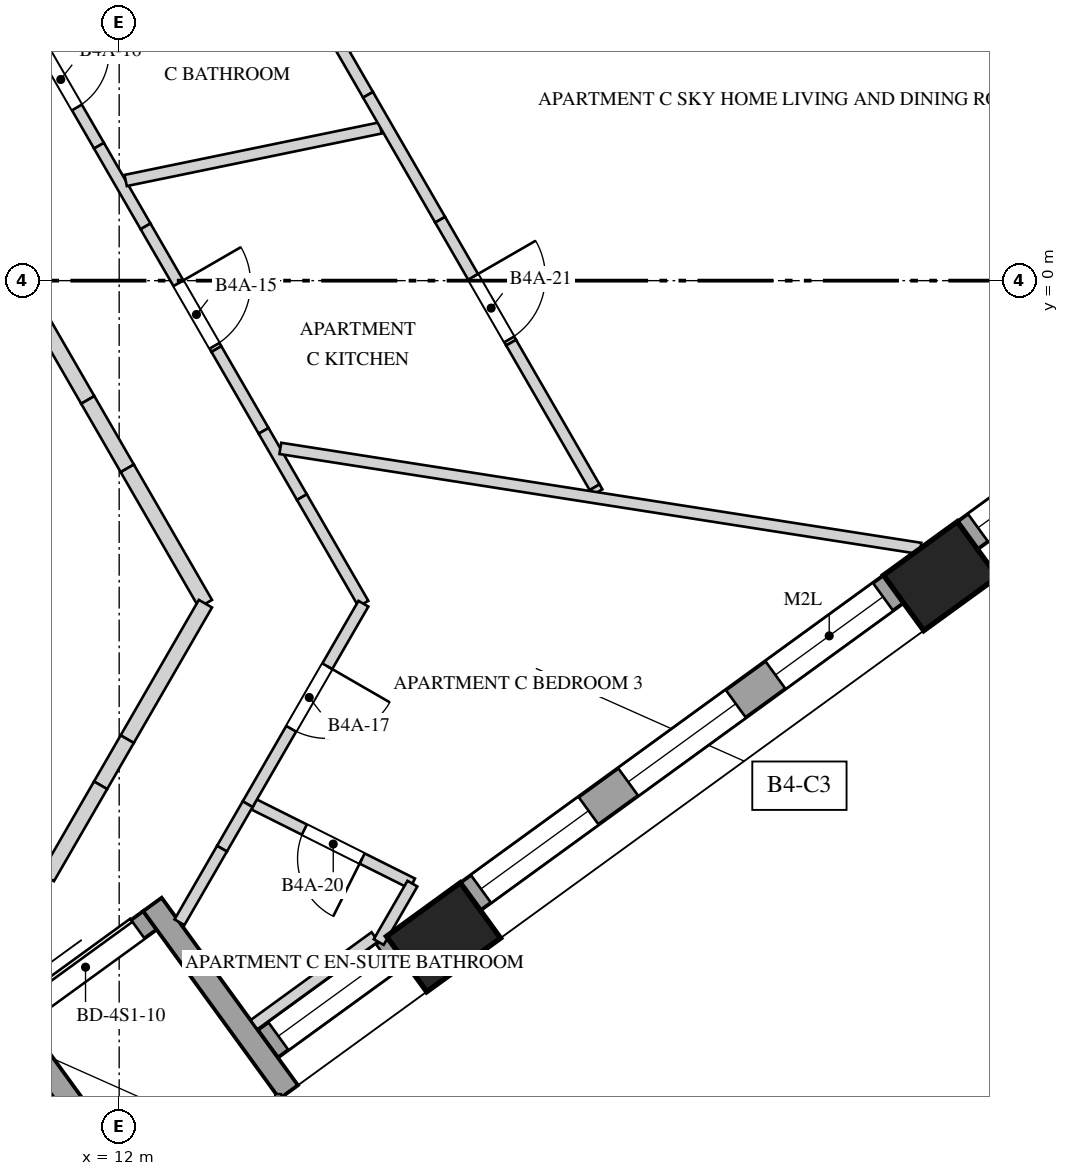
"""IFC4 building model, lengths in metres.
Left out: names, types, materials, properties, quantities, classifications, styles, units other than length and angle.
Written with IfcOpenShell. Run it as: python <this file> out.ifc"""

import sys

from ifc_helpers import new_model, si_unit, direction, frame, frame_2d, origin, origin_2d, place, context, subcontext, project, spatial, polyline, rectangle, outline, extrude, element, fill, save


model = new_model("IFC4")
c1 = context("Model", 3, precision=1e-05, world=origin(), true_north=direction((0.0, 1.0)))
c2 = subcontext(c1, "Body", "Model", "MODEL_VIEW")
j1 = project(units=[si_unit("LENGTHUNIT", "METRE"), si_unit("PLANEANGLEUNIT", "RADIAN")], contexts=[c1])
p1 = place(None, origin())
s1 = spatial("IfcSite", under=j1, at=p1, CompositionType="ELEMENT")
p2 = place(p1, origin())
s2 = spatial("IfcBuilding", under=s1, at=p2, CompositionType="ELEMENT")
p3 = place(p2, frame((0.0, 0.0, 162.8)))
s3 = spatial("IfcBuildingStorey", under=s2, at=p3, CompositionType="ELEMENT", Elevation=162.8)
for number, where, z_axis, x_axis in (
    (1, (16.267, -8.638, -0.35), (0.0, 0.0, 1.0), (0.809, 0.588, 0.0)),
    (2, (22.806, -3.887, -0.35), (0.0, 0.0, 1.0), (0.809, 0.588, 0.0)),
):
    element("IfcColumn", number, at=place(p3, frame(where, z_axis=z_axis, x_axis=x_axis)), inside=s3, PredefinedType="COLUMN", context=c2, shape_type="SweptSolid", body=[
        extrude(rectangle(XDim=1.2, YDim=0.9, at=origin_2d()), origin(), (0.0, 0.0, 1.0), 4.35),
    ])
p4 = place(p3, frame((13.955, -10.04, 0.0), z_axis=(0.0, 0.0, 1.0), x_axis=(0.809028366311, 0.587769599847, 0.0)))
e3 = element("IfcWall", 3, at=p4, inside=s3, PredefinedType="SOLIDWALL", context=c2, shape_type="SweptSolid", body=[
    extrude(rectangle(XDim=2.094, YDim=0.45, at=frame_2d((1.047, 0.0))), origin(), (0.0, 0.0, 1.0), 3.3),
])
p5 = place(p4, frame((0.172, 0.0, 0.5)))
e4 = element("IfcOpeningElement", 4, at=p5, cuts=e3, PredefinedType="OPENING", context=c2, shape_type="SweptSolid", body=[
    extrude(rectangle(XDim=1.75, YDim=2.65, at=frame_2d((0.875, 1.325))), frame((0.0, 0.235, 0.0), z_axis=(0.0, -1.0, 0.0), x_axis=(1.0, 0.0, 0.0)), (0.0, 0.0, 1.0), 0.47),
])
p6 = place(p3, frame((16.62, -8.104, 0.0), z_axis=(0.0, 0.0, 1.0), x_axis=(0.809016690404, 0.587785670672, 0.0)))
e5 = element("IfcWall", 5, at=p6, inside=s3, PredefinedType="SOLIDWALL", context=c2, shape_type="SweptSolid", body=[
    extrude(rectangle(XDim=6.883, YDim=0.45, at=frame_2d((3.441, 0.0))), origin(), (0.0, 0.0, 1.0), 3.3),
])
p7 = place(p6, frame((0.172, 0.0, 0.5)))
e6 = element("IfcOpeningElement", 6, at=p7, cuts=e5, PredefinedType="OPENING", context=c2, shape_type="SweptSolid", body=[
    extrude(rectangle(XDim=1.75, YDim=2.65, at=frame_2d((0.875, 1.325))), frame((0.0, 0.235, 0.0), z_axis=(0.0, -1.0, 0.0), x_axis=(1.0, 0.0, 0.0)), (0.0, 0.0, 1.0), 0.47),
])
p8 = place(p6, frame((2.566, 0.0, 0.5)))
e7 = element("IfcOpeningElement", 7, at=p8, cuts=e5, PredefinedType="OPENING", context=c2, shape_type="SweptSolid", body=[
    extrude(rectangle(XDim=1.75, YDim=2.65, at=frame_2d((0.875, 1.325))), frame((0.0, 0.235, 0.0), z_axis=(0.0, -1.0, 0.0), x_axis=(1.0, 0.0, 0.0)), (0.0, 0.0, 1.0), 0.47),
])
p9 = place(p6, frame((4.961, 0.0, 0.5)))
e8 = element("IfcOpeningElement", 8, at=p9, cuts=e5, PredefinedType="OPENING", context=c2, shape_type="SweptSolid", body=[
    extrude(rectangle(XDim=1.75, YDim=2.0, at=frame_2d((0.875, 1.0))), frame((0.0, 0.235, 0.0), z_axis=(0.0, -1.0, 0.0), x_axis=(1.0, 0.0, 0.0)), (0.0, 0.0, 1.0), 0.47),
])
p10 = place(p3, frame((23.159, -3.353, 0.0), z_axis=(0.0, 0.0, 1.0), x_axis=(0.809005790194, 0.587800673215, 0.0)))
e9 = element("IfcWall", 9, at=p10, inside=s3, PredefinedType="SOLIDWALL", context=c2, shape_type="SweptSolid", body=[
    extrude(rectangle(XDim=6.183, YDim=0.45, at=frame_2d((3.091, 0.0))), origin(), (0.0, 0.0, 1.0), 3.3),
])
p11 = place(p10, frame((0.172, 0.0, 0.5)))
e10 = element("IfcOpeningElement", 10, at=p11, cuts=e9, PredefinedType="OPENING", context=c2, shape_type="SweptSolid", body=[
    extrude(rectangle(XDim=1.75, YDim=2.65, at=frame_2d((0.875, 1.325))), frame((0.0, 0.235, 0.0), z_axis=(0.0, -1.0, 0.0), x_axis=(1.0, 0.0, 0.0)), (0.0, 0.0, 1.0), 0.47),
])
p12 = place(p10, frame((2.566, 0.0, 0.5)))
e11 = element("IfcOpeningElement", 11, at=p12, cuts=e9, PredefinedType="OPENING", context=c2, shape_type="SweptSolid", body=[
    extrude(rectangle(XDim=1.75, YDim=2.65, at=frame_2d((0.875, 1.325))), frame((0.0, 0.235, 0.0), z_axis=(0.0, -1.0, 0.0), x_axis=(1.0, 0.0, 0.0)), (0.0, 0.0, 1.0), 0.47),
])
p13 = place(p10, frame((4.936, 0.0, 0.5)))
e12 = element("IfcOpeningElement", 12, at=p13, cuts=e9, PredefinedType="OPENING", context=c2, shape_type="SweptSolid", body=[
    extrude(rectangle(XDim=1.1, YDim=2.0, at=frame_2d((0.55, 1.0))), frame((0.0, 0.235, 0.0), z_axis=(0.0, -1.0, 0.0), x_axis=(1.0, 0.0, 0.0)), (0.0, 0.0, 1.0), 0.47),
])
p14 = place(p3, frame((10.71, -9.647, 0.0), z_axis=(0.0, 0.0, 1.0), x_axis=(0.808972932648, 0.587845893277, 0.0)))
e13 = element("IfcWall", 13, at=p14, inside=s3, PredefinedType="SOLIDWALL", context=c2, shape_type="SweptSolid", body=[
    extrude(rectangle(XDim=2.094, YDim=0.3, at=frame_2d((1.047, 0.0))), origin(), (0.0, 0.0, 1.0), 3.3),
])
p15 = place(p14, frame((0.197, 0.0, 0.0)))
e14 = element("IfcOpeningElement", 14, at=p15, cuts=e13, PredefinedType="OPENING", context=c2, shape_type="SweptSolid", body=[
    extrude(rectangle(XDim=1.7, YDim=2.45, at=frame_2d((0.85, 1.225))), frame((0.0, 0.16, 0.0), z_axis=(0.0, -1.0, 0.0), x_axis=(1.0, 0.0, 0.0)), (0.0, 0.0, 1.0), 0.32),
])
for number, where, z_axis, x_axis in (
    (15, (12.293, -12.082, 0.0), (0.0, 0.0, 1.0), (-0.588, 0.809, 0.0)),
    (16, (14.23, -10.674, 0.0), (0.0, 0.0, 1.0), (-0.588, 0.809, 0.0)),
):
    element("IfcWall", number, at=place(p3, frame(where, z_axis=z_axis, x_axis=x_axis)), inside=s3, PredefinedType="SOLIDWALL", context=c2, shape_type="SweptSolid", body=[
        extrude(rectangle(XDim=3.05, YDim=0.3, at=frame_2d((1.525, 0.0))), origin(), (0.0, 0.0, 1.0), 3.3),
    ])
p16 = place(p3, frame((10.994, 3.058, 0.0), z_axis=(0.0, 0.0, 1.0), x_axis=(0.500022136814, -0.866012622712, 0.0)))
e17 = element("IfcWall", 17, at=p16, inside=s3, PredefinedType="PARTITIONING", context=c2, shape_type="SweptSolid", body=[
    extrude(outline(polyline([(0.0, 0.0), (1.481, 0.0), (1.481, 2.55), (0.554, 2.55), (0.554, 3.65), (0.0, 3.65), (0.0, 0.0)])), frame((0.0, 0.075, 0.0), z_axis=(0.0, -1.0, 0.0), x_axis=(1.0, 0.0, 0.0)), (0.0, 0.0, 1.0), 0.15),
])
p17 = place(p16, frame((0.05, 0.0, 0.0)))
e18 = element("IfcOpeningElement", 18, at=p17, cuts=e17, PredefinedType="OPENING", context=c2, shape_type="SweptSolid", body=[
    extrude(rectangle(XDim=0.85, YDim=2.4, at=frame_2d((0.425, 1.2))), frame((0.0, 0.085, 0.0), z_axis=(0.0, -1.0, 0.0), x_axis=(1.0, 0.0, 0.0)), (0.0, 0.0, 1.0), 0.17),
])
p18 = place(p3, frame((11.734, 1.775, 0.0), z_axis=(0.0, 0.0, 1.0), x_axis=(0.499975448907, -0.8660395779, 0.0)))
e19 = element("IfcWall", 19, at=p18, inside=s3, PredefinedType="PARTITIONING", context=c2, shape_type="SweptSolid", body=[
    extrude(rectangle(XDim=1.225, YDim=0.15, at=frame_2d((0.613, 0.0))), origin(), (0.0, 0.0, 1.0), 3.65),
])
p19 = place(p3, frame((12.347, 0.714, 0.0), z_axis=(0.0, 0.0, 1.0), x_axis=(0.499998297855, -0.866026386516, 0.0)))
e20 = element("IfcWall", 20, at=p19, inside=s3, PredefinedType="PARTITIONING", context=c2, shape_type="SweptSolid", body=[
    extrude(outline(polyline([(0.0, 0.0), (1.864, 0.0), (1.865, 3.65), (0.998, 3.65), (0.998, 2.55), (0.0, 2.55), (0.0, 0.0)])), frame((0.0, 0.075, 0.0), z_axis=(0.0, -1.0, 0.0), x_axis=(1.0, 0.0, 0.0)), (0.0, 0.0, 1.0), 0.15),
])
p20 = place(p19, frame((0.865, 0.0, 0.0)))
e21 = element("IfcOpeningElement", 21, at=p20, cuts=e20, PredefinedType="OPENING", context=c2, shape_type="SweptSolid", body=[
    extrude(rectangle(XDim=0.95, YDim=2.4, at=frame_2d((0.475, 1.2))), frame((0.0, 0.085, 0.0), z_axis=(0.0, -1.0, 0.0), x_axis=(1.0, 0.0, 0.0)), (0.0, 0.0, 1.0), 0.17),
])
p21 = place(p3, frame((13.279, -0.9, 0.0), z_axis=(0.0, 0.0, 1.0), x_axis=(0.500090980937, -0.865972869544, 0.0)))
e22 = element("IfcWall", 22, at=p21, inside=s3, PredefinedType="PARTITIONING", context=c2, shape_type="SweptSolid", body=[
    extrude(rectangle(XDim=1.242, YDim=0.15, at=frame_2d((0.621, 0.0))), origin(), (0.0, 0.0, 1.0), 3.65),
])
p22 = place(p3, frame((13.9, -1.976, 0.0), z_axis=(0.0, 0.0, 1.0), x_axis=(0.499946326053, -0.866056390234, 0.0)))
e23 = element("IfcWall", 23, at=p22, inside=s3, PredefinedType="PARTITIONING", context=c2, shape_type="SweptSolid", body=[
    extrude(rectangle(XDim=1.007, YDim=0.15, at=frame_2d((0.503, 0.0))), origin(), (0.0, 0.0, 1.0), 2.75),
])
p23 = place(p3, frame((14.404, -2.848, 0.0), z_axis=(0.0, 0.0, 1.0), x_axis=(0.499983569942, -0.866034889475, 0.0)))
e24 = element("IfcWall", 24, at=p23, inside=s3, PredefinedType="PARTITIONING", context=c2, shape_type="SweptSolid", body=[
    extrude(rectangle(XDim=1.619, YDim=0.15, at=frame_2d((0.809, 0.0))), origin(), (0.0, 0.0, 1.0), 3.65),
])
p24 = place(p3, frame((12.085, 1.318, 0.0), z_axis=(0.0, 0.0, 1.0), x_axis=(0.979403580684, 0.201912421962, 0.0)))
e25 = element("IfcWall", 25, at=p24, inside=s3, PredefinedType="PARTITIONING", context=c2, shape_type="SweptSolid", body=[
    extrude(rectangle(XDim=3.424, YDim=0.15, at=frame_2d((1.712, 0.0))), origin(), (0.0, 0.0, 1.0), 3.65),
])
p25 = place(p3, frame((14.81, 3.248, 0.0), z_axis=(0.0, 0.0, 1.0), x_axis=(0.499935264145, -0.866062775822, 0.0)))
e26 = element("IfcWall", 26, at=p25, inside=s3, PredefinedType="PARTITIONING", context=c2, shape_type="SweptSolid", body=[
    extrude(rectangle(XDim=0.927, YDim=0.15, at=frame_2d((0.463, 0.0))), origin(), (0.0, 0.0, 1.0), 2.55),
])
p26 = place(p3, frame((15.274, 2.445, 0.0), z_axis=(0.0, 0.0, 1.0), x_axis=(0.499971120268, -0.866042076863, 0.0)))
e27 = element("IfcWall", 27, at=p26, inside=s3, PredefinedType="PARTITIONING", context=c2, shape_type="SweptSolid", body=[
    extrude(rectangle(XDim=1.898, YDim=0.15, at=frame_2d((0.949, 0.0))), origin(), (0.0, 0.0, 1.0), 3.65),
])
p27 = place(p3, frame((16.223, 0.801, 0.0), z_axis=(0.0, 0.0, 1.0), x_axis=(0.500061949227, -0.865989634427, 0.0)))
e28 = element("IfcWall", 28, at=p27, inside=s3, PredefinedType="PARTITIONING", context=c2, shape_type="SweptSolid", body=[
    extrude(outline(polyline([(0.0, 0.0), (1.867, 0.0), (1.867, 3.65), (0.998, 3.65), (0.998, 2.55), (0.0, 2.55), (0.0, 0.0)])), frame((0.0, 0.075, 0.0), z_axis=(0.0, -1.0, 0.0), x_axis=(1.0, 0.0, 0.0)), (0.0, 0.0, 1.0), 0.15),
])
p28 = place(p27, frame((0.867, 0.0, 0.0)))
e29 = element("IfcOpeningElement", 29, at=p28, cuts=e28, PredefinedType="OPENING", context=c2, shape_type="SweptSolid", body=[
    extrude(rectangle(XDim=0.95, YDim=2.4, at=frame_2d((0.475, 1.2))), frame((0.0, 0.085, 0.0), z_axis=(0.0, -1.0, 0.0), x_axis=(1.0, 0.0, 0.0)), (0.0, 0.0, 1.0), 0.17),
])
p29 = place(p3, frame((17.156, -0.816, 0.0), z_axis=(0.0, 0.0, 1.0), x_axis=(0.500023898135, -0.86601160575, 0.0)))
e30 = element("IfcWall", 30, at=p29, inside=s3, PredefinedType="PARTITIONING", context=c2, shape_type="SweptSolid", body=[
    extrude(rectangle(XDim=2.197, YDim=0.15, at=frame_2d((1.098, 0.0))), origin(), (0.0, 0.0, 1.0), 3.65),
])
p30 = place(p3, frame((18.255, -2.718, 0.0), z_axis=(0.0, 0.0, 1.0), x_axis=(0.500005339912, -0.866022320763, 0.0)))
e31 = element("IfcWall", 31, at=p30, inside=s3, PredefinedType="PARTITIONING", context=c2, shape_type="SweptSolid", body=[
    extrude(rectangle(XDim=0.075, YDim=0.15, at=frame_2d((0.037, 0.0))), origin(), (0.0, 0.0, 1.0), 2.75),
])
p31 = place(p3, frame((15.858, -7.933, 0.0), z_axis=(0.0, 0.0, 1.0), x_axis=(-0.894343317487, 0.447381303215, 0.0)))
e32 = element("IfcWall", 32, at=p31, inside=s3, PredefinedType="PARTITIONING", context=c2, shape_type="SweptSolid", body=[
    extrude(rectangle(XDim=2.329, YDim=0.15, at=frame_2d((1.165, 0.0))), origin(), (0.0, 0.0, 1.0), 3.65),
])
p32 = place(p31, frame((0.74, 0.0, 0.0)))
e33 = element("IfcOpeningElement", 33, at=p32, cuts=e32, PredefinedType="OPENING", context=c2, shape_type="SweptSolid", body=[
    extrude(rectangle(XDim=0.85, YDim=2.4, at=frame_2d((0.425, 1.2))), frame((0.0, 0.085, 0.0), z_axis=(0.0, -1.0, 0.0), x_axis=(1.0, 0.0, 0.0)), (0.0, 0.0, 1.0), 0.17),
])
p33 = place(p3, frame((15.213, -4.25, 0.0), z_axis=(0.0, 0.0, 1.0), x_axis=(-0.500018497585, -0.866014723935, 0.0)))
e34 = element("IfcWall", 34, at=p33, inside=s3, PredefinedType="PARTITIONING", context=c2, shape_type="SweptSolid", body=[
    extrude(rectangle(XDim=3.046, YDim=0.15, at=frame_2d((1.523, 0.0))), origin(), (0.0, 0.0, 1.0), 3.65),
])
p34 = place(p33, frame((0.95, 0.0, 0.0)))
e35 = element("IfcOpeningElement", 35, at=p34, cuts=e34, PredefinedType="OPENING", context=c2, shape_type="SweptSolid", body=[
    extrude(rectangle(XDim=0.95, YDim=2.4, at=frame_2d((0.475, 1.2))), frame((0.0, 0.085, 0.0), z_axis=(0.0, -1.0, 0.0), x_axis=(1.0, 0.0, 0.0)), (0.0, 0.0, 1.0), 0.17),
])
p35 = place(p3, frame((13.69, -6.888, 0.0), z_axis=(0.0, 0.0, 1.0), x_axis=(-0.499910196476, -0.866077245666, 0.0)))
e36 = element("IfcWall", 36, at=p35, inside=s3, PredefinedType="PARTITIONING", context=c2, shape_type="SweptSolid", body=[
    extrude(rectangle(XDim=0.675, YDim=0.15, at=frame_2d((0.338, 0.0))), origin(), (0.0, 0.0, 1.0), 2.95),
])
p36 = place(p3, frame((13.353, -7.473, 0.0), z_axis=(0.0, 0.0, 1.0), x_axis=(-0.500037474894, -0.866003766563, 0.0)))
e37 = element("IfcWall", 37, at=p36, inside=s3, PredefinedType="PARTITIONING", context=c2, shape_type="SweptSolid", body=[
    extrude(rectangle(XDim=1.118, YDim=0.15, at=frame_2d((0.559, 0.0))), origin(), (0.0, 0.0, 1.0), 3.65),
])
p37 = place(p3, frame((15.365, -8.633, 0.0), z_axis=(0.0, 0.0, 1.0), x_axis=(-0.809036512602, -0.58775838682, 0.0)))
e38 = element("IfcWall", 38, at=p37, inside=s3, PredefinedType="PARTITIONING", context=c2, shape_type="SweptSolid", body=[
    extrude(rectangle(XDim=1.967, YDim=0.15, at=frame_2d((0.984, 0.0))), origin(), (0.0, 0.0, 1.0), 3.65),
])
p38 = place(p3, frame((15.858, -7.933, 0.0), z_axis=(0.0, 0.0, 1.0), x_axis=(-0.500016243463, -0.866016025414, 0.0)))
e39 = element("IfcWall", 39, at=p38, inside=s3, PredefinedType="PARTITIONING", context=c2, shape_type="SweptSolid", body=[
    extrude(rectangle(XDim=0.887, YDim=0.15, at=frame_2d((0.444, 0.0))), origin(), (0.0, 0.0, 1.0), 2.95),
])
p39 = place(p3, frame((22.542, -3.523, 0.0), z_axis=(0.0, 0.0, 1.0), x_axis=(-0.988002612028, 0.154437167243, 0.0)))
e40 = element("IfcWall", 40, at=p39, inside=s3, PredefinedType="PARTITIONING", context=c2, shape_type="SweptSolid", body=[
    extrude(rectangle(XDim=8.524, YDim=0.15, at=frame_2d((4.262, 0.0))), origin(), (0.0, 0.0, 1.0), 2.75),
])
p40 = place(p3, frame((10.801, -0.208, 0.0), z_axis=(0.0, 0.0, 1.0), x_axis=(0.500031717574, -0.86600709086, 0.0)))
e41 = element("IfcWall", 41, at=p40, inside=s3, PredefinedType="SOLIDWALL", context=c2, shape_type="SweptSolid", body=[
    extrude(rectangle(XDim=1.572, YDim=0.2, at=frame_2d((0.786, 0.0))), origin(), (0.0, 0.0, 1.0), 3.65),
])
p41 = place(p3, frame((11.587, -1.569, 0.0), z_axis=(0.0, 0.0, 1.0), x_axis=(0.500054530113, -0.86599391852, 0.0)))
e42 = element("IfcWall", 42, at=p41, inside=s3, PredefinedType="SOLIDWALL", context=c2, shape_type="SweptSolid", body=[
    extrude(rectangle(XDim=1.04, YDim=0.2, at=frame_2d((0.52, 0.0))), origin(), (0.0, 0.0, 1.0), 2.75),
])
p42 = place(p3, frame((12.107, -2.469, 0.0), z_axis=(0.0, 0.0, 1.0), x_axis=(0.499982825521, -0.866035319247, 0.0)))
e43 = element("IfcWall", 43, at=p42, inside=s3, PredefinedType="SOLIDWALL", context=c2, shape_type="SweptSolid", body=[
    extrude(rectangle(XDim=2.056, YDim=0.2, at=frame_2d((1.028, 0.0))), origin(), (0.0, 0.0, 1.0), 3.65),
])
p43 = place(p3, frame((13.135, -4.25, 0.0), z_axis=(0.0, 0.0, 1.0), x_axis=(-0.500030520673, -0.866007781949, 0.0)))
e44 = element("IfcWall", 44, at=p43, inside=s3, PredefinedType="SOLIDWALL", context=c2, shape_type="SweptSolid", body=[
    extrude(rectangle(XDim=2.058, YDim=0.2, at=frame_2d((1.029, 0.0))), origin(), (0.0, 0.0, 1.0), 3.65),
])
p44 = place(p3, frame((12.106, -6.032, 0.0), z_axis=(0.0, 0.0, 1.0), x_axis=(-0.49996389635, -0.866046247233, 0.0)))
e45 = element("IfcWall", 45, at=p44, inside=s3, PredefinedType="SOLIDWALL", context=c2, shape_type="SweptSolid", body=[
    extrude(rectangle(XDim=0.7, YDim=0.2, at=frame_2d((0.35, 0.0))), origin(), (0.0, 0.0, 1.0), 2.95),
])
p45 = place(p3, frame((11.756, -6.639, 0.0), z_axis=(0.0, 0.0, 1.0), x_axis=(-0.49998411664, -0.866034573852, 0.0)))
e46 = element("IfcWall", 46, at=p45, inside=s3, PredefinedType="SOLIDWALL", context=c2, shape_type="SweptSolid", body=[
    extrude(rectangle(XDim=1.4, YDim=0.2, at=frame_2d((0.7, 0.0))), origin(), (0.0, 0.0, 1.0), 3.65),
])
p46 = place(p5, origin())
e47 = element("IfcWindow", 47, at=p46, inside=s3, PartitioningType="SINGLE_PANEL", PredefinedType="WINDOW", context=c2, shape_type="SweptSolid", body=[
    extrude(rectangle(XDim=1.75, YDim=2.65, at=frame_2d((0.875, 1.325))), frame((0.0, 0.03, 0.0), z_axis=(0.0, -1.0, 0.0), x_axis=(1.0, 0.0, 0.0)), (0.0, 0.0, 1.0), 0.06),
])
fill(e4, e47)
p47 = place(p7, origin())
e48 = element("IfcWindow", 48, at=p47, inside=s3, PartitioningType="SINGLE_PANEL", PredefinedType="WINDOW", context=c2, shape_type="SweptSolid", body=[
    extrude(rectangle(XDim=1.75, YDim=2.65, at=frame_2d((0.875, 1.325))), frame((0.0, 0.03, 0.0), z_axis=(0.0, -1.0, 0.0), x_axis=(1.0, 0.0, 0.0)), (0.0, 0.0, 1.0), 0.06),
])
fill(e6, e48)
p48 = place(p8, origin())
e49 = element("IfcWindow", 49, at=p48, inside=s3, PartitioningType="SINGLE_PANEL", PredefinedType="WINDOW", context=c2, shape_type="SweptSolid", body=[
    extrude(rectangle(XDim=1.75, YDim=2.65, at=frame_2d((0.875, 1.325))), frame((0.0, 0.03, 0.0), z_axis=(0.0, -1.0, 0.0), x_axis=(1.0, 0.0, 0.0)), (0.0, 0.0, 1.0), 0.06),
])
fill(e7, e49)
p49 = place(p9, origin())
e50 = element("IfcWindow", 50, at=p49, inside=s3, PartitioningType="SINGLE_PANEL", PredefinedType="WINDOW", context=c2, shape_type="SweptSolid", body=[
    extrude(rectangle(XDim=1.75, YDim=2.0, at=frame_2d((0.875, 1.0))), frame((0.0, 0.03, 0.0), z_axis=(0.0, -1.0, 0.0), x_axis=(1.0, 0.0, 0.0)), (0.0, 0.0, 1.0), 0.06),
])
fill(e8, e50)
p50 = place(p11, origin())
e51 = element("IfcWindow", 51, at=p50, inside=s3, PartitioningType="SINGLE_PANEL", PredefinedType="WINDOW", context=c2, shape_type="SweptSolid", body=[
    extrude(rectangle(XDim=1.75, YDim=2.65, at=frame_2d((0.875, 1.325))), frame((0.0, 0.03, 0.0), z_axis=(0.0, -1.0, 0.0), x_axis=(1.0, 0.0, 0.0)), (0.0, 0.0, 1.0), 0.06),
])
fill(e10, e51)
p51 = place(p15, origin())
e52 = element("IfcDoor", 52, at=p51, inside=s3, OperationType="SLIDING_TO_LEFT", PredefinedType="DOOR", context=c2, shape_type="SweptSolid", body=[
    extrude(rectangle(XDim=1.7, YDim=2.45, at=frame_2d((0.85, 1.225))), frame((0.0, 0.025, 0.0), z_axis=(0.0, -1.0, 0.0), x_axis=(1.0, 0.0, 0.0)), (0.0, 0.0, 1.0), 0.05),
])
fill(e14, e52)
p52 = place(p20, origin())
e53 = element("IfcDoor", 53, at=p52, inside=s3, OperationType="SINGLE_SWING_LEFT", PredefinedType="DOOR", context=c2, shape_type="SweptSolid", body=[
    extrude(rectangle(XDim=0.95, YDim=2.4, at=frame_2d((0.475, 1.2))), frame((0.0, 0.025, 0.0), z_axis=(0.0, -1.0, 0.0), x_axis=(1.0, 0.0, 0.0)), (0.0, 0.0, 1.0), 0.05),
])
fill(e21, e53)
p53 = place(p17, origin())
e54 = element("IfcDoor", 54, at=p53, inside=s3, OperationType="SINGLE_SWING_RIGHT", PredefinedType="DOOR", context=c2, shape_type="SweptSolid", body=[
    extrude(rectangle(XDim=0.85, YDim=2.4, at=frame_2d((0.425, 1.2))), frame((0.0, 0.025, 0.0), z_axis=(0.0, -1.0, 0.0), x_axis=(1.0, 0.0, 0.0)), (0.0, 0.0, 1.0), 0.05),
])
fill(e18, e54)
p54 = place(p34, origin())
e55 = element("IfcDoor", 55, at=p54, inside=s3, OperationType="SINGLE_SWING_LEFT", PredefinedType="DOOR", context=c2, shape_type="SweptSolid", body=[
    extrude(rectangle(XDim=0.95, YDim=2.4, at=frame_2d((0.475, 1.2))), frame((0.0, 0.025, 0.0), z_axis=(0.0, -1.0, 0.0), x_axis=(1.0, 0.0, 0.0)), (0.0, 0.0, 1.0), 0.05),
])
fill(e35, e55)
p55 = place(p32, origin())
e56 = element("IfcDoor", 56, at=p55, inside=s3, OperationType="SINGLE_SWING_RIGHT", PredefinedType="DOOR", context=c2, shape_type="SweptSolid", body=[
    extrude(rectangle(XDim=0.85, YDim=2.4, at=frame_2d((0.425, 1.2))), frame((0.0, 0.025, 0.0), z_axis=(0.0, -1.0, 0.0), x_axis=(1.0, 0.0, 0.0)), (0.0, 0.0, 1.0), 0.05),
])
fill(e33, e56)
p56 = place(p28, origin())
e57 = element("IfcDoor", 57, at=p56, inside=s3, OperationType="SINGLE_SWING_LEFT", PredefinedType="DOOR", context=c2, shape_type="SweptSolid", body=[
    extrude(rectangle(XDim=0.95, YDim=2.4, at=frame_2d((0.475, 1.2))), frame((0.0, 0.025, 0.0), z_axis=(0.0, -1.0, 0.0), x_axis=(1.0, 0.0, 0.0)), (0.0, 0.0, 1.0), 0.05),
])
fill(e29, e57)
save(model, sys.argv[1])
